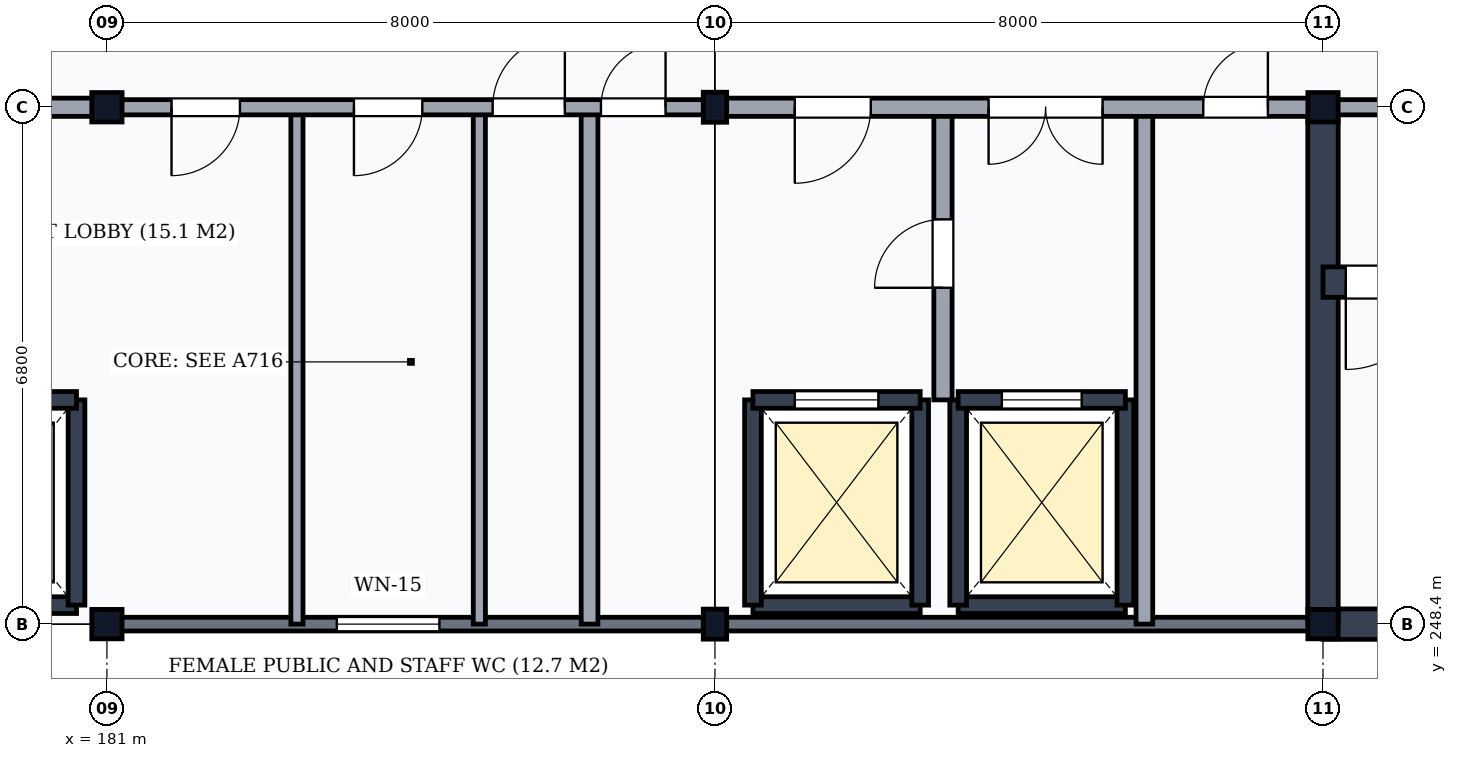
"""IFC4 building model, lengths in metres.
Left out: names, types, materials, properties, quantities, classifications, styles, units other than length and angle.
Written with IfcOpenShell. Run it as: python <this file> out.ifc"""

import sys

from ifc_helpers import new_model, si_unit, direction, frame, frame_2d, origin, origin_2d, place, context, subcontext, project, spatial, rectangle, i_section, extrude, element, fill, save


model = new_model("IFC4")
c1 = context("Model", 3, precision=1e-05, world=origin(), true_north=direction((0.0, 1.0)))
c2 = subcontext(c1, "Body", "Model", "MODEL_VIEW")
j1 = project(units=[si_unit("LENGTHUNIT", "METRE"), si_unit("PLANEANGLEUNIT", "RADIAN")], contexts=[c1])
p1 = place(None, origin())
s1 = spatial("IfcSite", under=j1, at=p1, CompositionType="ELEMENT")
p2 = place(p1, origin())
s2 = spatial("IfcBuilding", under=s1, at=p2, CompositionType="ELEMENT")
p3 = place(p2, frame((0.0, 0.0, 24.3)))
s3 = spatial("IfcBuildingStorey", under=s2, at=p3, CompositionType="ELEMENT", Elevation=24.3)
for number, where, z_axis, x_axis in (
    (1, (181.0, 248.4, 0.0), (0.0, 0.0, 1.0), (1.0, 0.0, 0.0)),
    (2, (181.0, 255.2, 0.0), (0.0, 0.0, 1.0), (1.0, 0.0, 0.0)),
):
    element("IfcColumn", number, at=place(p3, frame(where, z_axis=z_axis, x_axis=x_axis)), inside=s3, PredefinedType="COLUMN", context=c2, shape_type="SweptSolid", body=[
        extrude(i_section(OverallWidth=0.398, OverallDepth=0.387, WebThickness=0.021, FlangeThickness=0.033, FilletRadius=0.015, at=origin_2d()), origin(), (0.0, 0.0, 1.0), 3.9),
    ])
for number, where, z_axis, x_axis in (
    (3, (189.0, 248.4, 0.0), (0.0, 0.0, 1.0), (1.0, 0.0, 0.0)),
    (4, (189.0, 255.2, 0.0), (0.0, 0.0, 1.0), (1.0, 0.0, 0.0)),
):
    element("IfcColumn", number, at=place(p3, frame(where, z_axis=z_axis, x_axis=x_axis)), inside=s3, PredefinedType="COLUMN", context=c2, shape_type="SweptSolid", body=[
        extrude(i_section(OverallWidth=0.308, OverallDepth=0.395, WebThickness=0.021, FlangeThickness=0.04, FilletRadius=0.027, at=origin_2d()), origin(), (0.0, 0.0, 1.0), 3.9),
    ])
for number, where, z_axis, x_axis in (
    (5, (197.0, 248.4, 0.0), (0.0, 0.0, 1.0), (1.0, 0.0, 0.0)),
    (6, (197.0, 255.2, 0.0), (0.0, 0.0, 1.0), (1.0, 0.0, 0.0)),
):
    element("IfcColumn", number, at=place(p3, frame(where, z_axis=z_axis, x_axis=x_axis)), inside=s3, PredefinedType="COLUMN", context=c2, shape_type="SweptSolid", body=[
        extrude(i_section(OverallWidth=0.398, OverallDepth=0.387, WebThickness=0.021, FlangeThickness=0.033, FilletRadius=0.015, at=origin_2d()), origin(), (0.0, 0.0, 1.0), 3.9),
    ])
p4 = place(p3, frame((181.006, 248.4, 0.0), z_axis=(0.0, 0.0, 1.0), x_axis=(1.0, 0.0, 0.0)))
e7 = element("IfcWall", 7, at=p4, inside=s3, PredefinedType="SOLIDWALL", context=c2, shape_type="SweptSolid", body=[
    extrude(rectangle(XDim=7.988, YDim=0.18, at=frame_2d((3.994, 0.0))), origin(), (0.0, 0.0, 1.0), 3.348),
])
p5 = place(p4, frame((3.019, 0.0, 0.95)))
e8 = element("IfcOpeningElement", 8, at=p5, cuts=e7, PredefinedType="OPENING", context=c2, shape_type="SweptSolid", body=[
    extrude(rectangle(XDim=1.35, YDim=1.8, at=frame_2d((0.675, 0.9))), frame((0.0, 0.105, 0.0), z_axis=(0.0, -1.0, 0.0), x_axis=(1.0, 0.0, 0.0)), (0.0, 0.0, 1.0), 0.21),
])
p6 = place(p3, frame((189.006, 248.4, 0.0), z_axis=(0.0, 0.0, 1.0), x_axis=(1.0, 0.0, 0.0)))
e9 = element("IfcWall", 9, at=p6, inside=s3, PredefinedType="SOLIDWALL", context=c2, shape_type="SweptSolid", body=[
    extrude(rectangle(XDim=7.988, YDim=0.18, at=frame_2d((3.994, 0.0))), origin(), (0.0, 0.0, 1.0), 3.348),
])
p7 = place(p3, frame((197.0, 248.4, 0.0), z_axis=(0.0, 0.0, 1.0), x_axis=(1.0, 0.0, 0.0)))
e10 = element("IfcWall", 10, at=p7, inside=s3, PredefinedType="SHEAR", context=c2, shape_type="SweptSolid", body=[
    extrude(rectangle(XDim=8.0, YDim=0.4, at=frame_2d((4.0, 0.0))), origin(), (0.0, 0.0, 1.0), 3.66),
])
p8 = place(p3, frame((197.0, 248.4, 0.0), z_axis=(0.0, 0.0, 1.0), x_axis=(0.0, 1.0, 0.0)))
e11 = element("IfcWall", 11, at=p8, inside=s3, PredefinedType="SHEAR", context=c2, shape_type="SweptSolid", body=[
    extrude(rectangle(XDim=6.8, YDim=0.4, at=frame_2d((3.4, 0.0))), origin(), (0.0, 0.0, 1.0), 3.66),
])
p9 = place(p3, frame((197.0, 252.9, 0.0), z_axis=(0.0, 0.0, 1.0), x_axis=(1.0, 0.0, 0.0)))
e12 = element("IfcWall", 12, at=p9, inside=s3, PredefinedType="SHEAR", context=c2, shape_type="SweptSolid", body=[
    extrude(rectangle(XDim=8.0, YDim=0.4, at=frame_2d((4.0, 0.0))), origin(), (0.0, 0.0, 1.0), 3.66),
])
p10 = place(p9, frame((0.3, 0.0, 0.0)))
e13 = element("IfcOpeningElement", 13, at=p10, cuts=e12, PredefinedType="OPENING", context=c2, shape_type="SweptSolid", body=[
    extrude(rectangle(XDim=1.15, YDim=2.15, at=frame_2d((0.575, 1.075))), frame((0.0, 0.215, 0.0), z_axis=(0.0, -1.0, 0.0), x_axis=(1.0, 0.0, 0.0)), (0.0, 0.0, 1.0), 0.43),
])
p11 = place(p3, frame((197.0, 255.2, 0.0), z_axis=(0.0, 0.0, 1.0), x_axis=(1.0, 0.0, 0.0)))
e14 = element("IfcWall", 14, at=p11, inside=s3, PredefinedType="PARTITIONING", context=c2, shape_type="SweptSolid", body=[
    extrude(rectangle(XDim=8.0, YDim=0.2, at=frame_2d((4.0, 0.0))), origin(), (0.0, 0.0, 1.0), 3.058),
])
p12 = place(p11, frame((3.275, 0.0, 0.0)))
e15 = element("IfcOpeningElement", 15, at=p12, cuts=e14, PredefinedType="OPENING", context=c2, shape_type="SweptSolid", body=[
    extrude(rectangle(XDim=1.45, YDim=2.2, at=frame_2d((0.725, 1.1))), frame((0.0, 0.115, 0.0), z_axis=(0.0, -1.0, 0.0), x_axis=(1.0, 0.0, 0.0)), (0.0, 0.0, 1.0), 0.23),
])
p13 = place(p3, frame((178.4, 248.65, 0.0), z_axis=(0.0, 0.0, 1.0), x_axis=(1.0, 0.0, 0.0)))
e16 = element("IfcWall", 16, at=p13, inside=s3, PredefinedType="SHEAR", context=c2, shape_type="SweptSolid", body=[
    extrude(rectangle(XDim=2.2, YDim=0.22, at=frame_2d((1.1, 0.0))), origin(), (0.0, 0.0, 1.0), 3.66),
])
p14 = place(p3, frame((180.6, 248.65, 0.0), z_axis=(0.0, 0.0, 1.0), x_axis=(0.0, 1.0, 0.0)))
e17 = element("IfcWall", 17, at=p14, inside=s3, PredefinedType="SHEAR", context=c2, shape_type="SweptSolid", body=[
    extrude(rectangle(XDim=2.7, YDim=0.22, at=frame_2d((1.35, 0.0))), origin(), (0.0, 0.0, 1.0), 3.66),
])
p15 = place(p3, frame((178.4, 251.35, 0.0), z_axis=(0.0, 0.0, 1.0), x_axis=(1.0, 0.0, 0.0)))
e18 = element("IfcWall", 18, at=p15, inside=s3, PredefinedType="SHEAR", context=c2, shape_type="SweptSolid", body=[
    extrude(rectangle(XDim=2.2, YDim=0.22, at=frame_2d((1.1, 0.0))), origin(), (0.0, 0.0, 1.0), 3.66),
])
p16 = place(p15, frame((0.575, 0.0, 0.0)))
e19 = element("IfcOpeningElement", 19, at=p16, cuts=e18, PredefinedType="OPENING", context=c2, shape_type="SweptSolid", body=[
    extrude(rectangle(XDim=1.05, YDim=2.15, at=frame_2d((0.525, 1.075))), frame((0.0, 0.125, 0.0), z_axis=(0.0, -1.0, 0.0), x_axis=(1.0, 0.0, 0.0)), (0.0, 0.0, 1.0), 0.25),
])
p17 = place(p3, frame((189.5, 248.65, 0.0), z_axis=(0.0, 0.0, 1.0), x_axis=(1.0, 0.0, 0.0)))
e20 = element("IfcWall", 20, at=p17, inside=s3, PredefinedType="SHEAR", context=c2, shape_type="SweptSolid", body=[
    extrude(rectangle(XDim=2.2, YDim=0.22, at=frame_2d((1.1, 0.0))), origin(), (0.0, 0.0, 1.0), 3.66),
])
for number, where, z_axis, x_axis in (
    (21, (189.5, 248.65, 0.0), (0.0, 0.0, 1.0), (0.0, 1.0, 0.0)),
    (22, (191.7, 248.65, 0.0), (0.0, 0.0, 1.0), (0.0, 1.0, 0.0)),
):
    element("IfcWall", number, at=place(p3, frame(where, z_axis=z_axis, x_axis=x_axis)), inside=s3, PredefinedType="SHEAR", context=c2, shape_type="SweptSolid", body=[
        extrude(rectangle(XDim=2.7, YDim=0.22, at=frame_2d((1.35, 0.0))), origin(), (0.0, 0.0, 1.0), 3.66),
    ])
p18 = place(p3, frame((189.5, 251.35, 0.0), z_axis=(0.0, 0.0, 1.0), x_axis=(1.0, 0.0, 0.0)))
e23 = element("IfcWall", 23, at=p18, inside=s3, PredefinedType="SHEAR", context=c2, shape_type="SweptSolid", body=[
    extrude(rectangle(XDim=2.2, YDim=0.22, at=frame_2d((1.1, 0.0))), origin(), (0.0, 0.0, 1.0), 3.66),
])
p19 = place(p18, frame((0.55, 0.0, 0.0)))
e24 = element("IfcOpeningElement", 24, at=p19, cuts=e23, PredefinedType="OPENING", context=c2, shape_type="SweptSolid", body=[
    extrude(rectangle(XDim=1.1, YDim=2.15, at=frame_2d((0.55, 1.075))), frame((0.0, 0.125, 0.0), z_axis=(0.0, -1.0, 0.0), x_axis=(1.0, 0.0, 0.0)), (0.0, 0.0, 1.0), 0.25),
])
p20 = place(p3, frame((192.2, 248.65, 0.0), z_axis=(0.0, 0.0, 1.0), x_axis=(1.0, 0.0, 0.0)))
e25 = element("IfcWall", 25, at=p20, inside=s3, PredefinedType="SHEAR", context=c2, shape_type="SweptSolid", body=[
    extrude(rectangle(XDim=2.2, YDim=0.22, at=frame_2d((1.1, 0.0))), origin(), (0.0, 0.0, 1.0), 3.66),
])
for number, where, z_axis, x_axis in (
    (26, (192.2, 248.65, 0.0), (0.0, 0.0, 1.0), (0.0, 1.0, 0.0)),
    (27, (194.4, 248.65, 0.0), (0.0, 0.0, 1.0), (0.0, 1.0, 0.0)),
):
    element("IfcWall", number, at=place(p3, frame(where, z_axis=z_axis, x_axis=x_axis)), inside=s3, PredefinedType="SHEAR", context=c2, shape_type="SweptSolid", body=[
        extrude(rectangle(XDim=2.7, YDim=0.22, at=frame_2d((1.35, 0.0))), origin(), (0.0, 0.0, 1.0), 3.66),
    ])
p21 = place(p3, frame((192.2, 251.35, 0.0), z_axis=(0.0, 0.0, 1.0), x_axis=(1.0, 0.0, 0.0)))
e28 = element("IfcWall", 28, at=p21, inside=s3, PredefinedType="SHEAR", context=c2, shape_type="SweptSolid", body=[
    extrude(rectangle(XDim=2.2, YDim=0.22, at=frame_2d((1.1, 0.0))), origin(), (0.0, 0.0, 1.0), 3.66),
])
p22 = place(p21, frame((0.575, 0.0, 0.0)))
e29 = element("IfcOpeningElement", 29, at=p22, cuts=e28, PredefinedType="OPENING", context=c2, shape_type="SweptSolid", body=[
    extrude(rectangle(XDim=1.05, YDim=2.15, at=frame_2d((0.525, 1.075))), frame((0.0, 0.125, 0.0), z_axis=(0.0, -1.0, 0.0), x_axis=(1.0, 0.0, 0.0)), (0.0, 0.0, 1.0), 0.25),
])
p23 = place(p3, frame((192.0, 251.35, 0.0), z_axis=(0.0, 0.0, 1.0), x_axis=(0.0, 1.0, 0.0)))
e30 = element("IfcWall", 30, at=p23, inside=s3, PredefinedType="PARTITIONING", context=c2, shape_type="SweptSolid", body=[
    extrude(rectangle(XDim=3.85, YDim=0.24, at=frame_2d((1.925, 0.0))), origin(), (0.0, 0.0, 1.0), 3.66),
])
p24 = place(p23, frame((1.475, 0.0, 0.0)))
e31 = element("IfcOpeningElement", 31, at=p24, cuts=e30, PredefinedType="OPENING", context=c2, shape_type="SweptSolid", body=[
    extrude(rectangle(XDim=0.9, YDim=2.1, at=frame_2d((0.45, 1.05))), frame((0.0, 0.135, 0.0), z_axis=(0.0, -1.0, 0.0), x_axis=(1.0, 0.0, 0.0)), (0.0, 0.0, 1.0), 0.27),
])
p25 = place(p3, frame((194.65, 248.4, 0.0), z_axis=(0.0, 0.0, 1.0), x_axis=(0.0, 1.0, 0.0)))
e32 = element("IfcWall", 32, at=p25, inside=s3, PredefinedType="PARTITIONING", context=c2, shape_type="SweptSolid", body=[
    extrude(rectangle(XDim=6.8, YDim=0.22, at=frame_2d((3.4, 0.0))), origin(), (0.0, 0.0, 1.0), 3.66),
])
for number, where, z_axis, x_axis in (
    (33, (183.5, 248.4, 0.0), (0.0, 0.0, 1.0), (0.0, 1.0, 0.0)),
    (34, (185.9, 248.4, 0.0), (0.0, 0.0, 1.0), (0.0, 1.0, 0.0)),
):
    element("IfcWall", number, at=place(p3, frame(where, z_axis=z_axis, x_axis=x_axis)), inside=s3, PredefinedType="PARTITIONING", context=c2, shape_type="SweptSolid", body=[
        extrude(rectangle(XDim=6.8, YDim=0.16, at=frame_2d((3.4, 0.0))), origin(), (0.0, 0.0, 1.0), 3.66),
    ])
p26 = place(p3, frame((187.35, 248.4, 0.0), z_axis=(0.0, 0.0, 1.0), x_axis=(0.0, 1.0, 0.0)))
e35 = element("IfcWall", 35, at=p26, inside=s3, PredefinedType="PARTITIONING", context=c2, shape_type="SweptSolid", body=[
    extrude(rectangle(XDim=6.8, YDim=0.22, at=frame_2d((3.4, 0.0))), origin(), (0.0, 0.0, 1.0), 3.66),
])
p27 = place(p3, frame((173.0, 255.2, 0.0), z_axis=(0.0, 0.0, 1.0), x_axis=(1.0, 0.0, 0.0)))
e36 = element("IfcWall", 36, at=p27, inside=s3, PredefinedType="PARTITIONING", context=c2, shape_type="SweptSolid", body=[
    extrude(rectangle(XDim=8.0, YDim=0.24, at=frame_2d((4.0, 0.0))), origin(), (0.0, 0.0, 1.0), 3.058),
])
p28 = place(p27, frame((1.05, 0.0, 0.0)))
e37 = element("IfcOpeningElement", 37, at=p28, cuts=e36, PredefinedType="OPENING", context=c2, shape_type="SweptSolid", body=[
    extrude(rectangle(XDim=1.0, YDim=2.1, at=frame_2d((0.5, 1.05))), frame((0.0, 0.135, 0.0), z_axis=(0.0, -1.0, 0.0), x_axis=(1.0, 0.0, 0.0)), (0.0, 0.0, 1.0), 0.27),
])
p29 = place(p27, frame((4.6, 0.0, 0.0)))
e38 = element("IfcOpeningElement", 38, at=p29, cuts=e36, PredefinedType="OPENING", context=c2, shape_type="SweptSolid", body=[
    extrude(rectangle(XDim=1.6, YDim=2.25, at=frame_2d((0.8, 1.125))), frame((0.0, 0.135, 0.0), z_axis=(0.0, -1.0, 0.0), x_axis=(1.0, 0.0, 0.0)), (0.0, 0.0, 1.0), 0.27),
])
p30 = place(p3, frame((181.0, 255.2, 0.0), z_axis=(0.0, 0.0, 1.0), x_axis=(1.0, 0.0, 0.0)))
e39 = element("IfcWall", 39, at=p30, inside=s3, PredefinedType="PARTITIONING", context=c2, shape_type="SweptSolid", body=[
    extrude(rectangle(XDim=8.0, YDim=0.2, at=frame_2d((4.0, 0.0))), origin(), (0.0, 0.0, 1.0), 3.058),
])
p31 = place(p30, frame((0.85, 0.0, 0.0)))
e40 = element("IfcOpeningElement", 40, at=p31, cuts=e39, PredefinedType="OPENING", context=c2, shape_type="SweptSolid", body=[
    extrude(rectangle(XDim=0.9, YDim=2.1, at=frame_2d((0.45, 1.05))), frame((0.0, 0.115, 0.0), z_axis=(0.0, -1.0, 0.0), x_axis=(1.0, 0.0, 0.0)), (0.0, 0.0, 1.0), 0.23),
])
p32 = place(p30, frame((3.25, 0.0, 0.0)))
e41 = element("IfcOpeningElement", 41, at=p32, cuts=e39, PredefinedType="OPENING", context=c2, shape_type="SweptSolid", body=[
    extrude(rectangle(XDim=0.9, YDim=2.1, at=frame_2d((0.45, 1.05))), frame((0.0, 0.115, 0.0), z_axis=(0.0, -1.0, 0.0), x_axis=(1.0, 0.0, 0.0)), (0.0, 0.0, 1.0), 0.23),
])
p33 = place(p30, frame((5.075, 0.0, 0.0)))
e42 = element("IfcOpeningElement", 42, at=p33, cuts=e39, PredefinedType="OPENING", context=c2, shape_type="SweptSolid", body=[
    extrude(rectangle(XDim=0.95, YDim=2.1, at=frame_2d((0.475, 1.05))), frame((0.0, 0.115, 0.0), z_axis=(0.0, -1.0, 0.0), x_axis=(1.0, 0.0, 0.0)), (0.0, 0.0, 1.0), 0.23),
])
p34 = place(p30, frame((6.5, 0.0, 0.0)))
e43 = element("IfcOpeningElement", 43, at=p34, cuts=e39, PredefinedType="OPENING", context=c2, shape_type="SweptSolid", body=[
    extrude(rectangle(XDim=0.85, YDim=2.1, at=frame_2d((0.425, 1.05))), frame((0.0, 0.115, 0.0), z_axis=(0.0, -1.0, 0.0), x_axis=(1.0, 0.0, 0.0)), (0.0, 0.0, 1.0), 0.23),
])
p35 = place(p3, frame((189.0, 255.2, 0.0), z_axis=(0.0, 0.0, 1.0), x_axis=(1.0, 0.0, 0.0)))
e44 = element("IfcWall", 44, at=p35, inside=s3, PredefinedType="PARTITIONING", context=c2, shape_type="SweptSolid", body=[
    extrude(rectangle(XDim=8.0, YDim=0.24, at=frame_2d((4.0, 0.0))), origin(), (0.0, 0.0, 1.0), 3.058),
])
p36 = place(p35, frame((1.05, 0.0, 0.0)))
e45 = element("IfcOpeningElement", 45, at=p36, cuts=e44, PredefinedType="OPENING", context=c2, shape_type="SweptSolid", body=[
    extrude(rectangle(XDim=1.0, YDim=2.1, at=frame_2d((0.5, 1.05))), frame((0.0, 0.135, 0.0), z_axis=(0.0, -1.0, 0.0), x_axis=(1.0, 0.0, 0.0)), (0.0, 0.0, 1.0), 0.27),
])
p37 = place(p35, frame((3.6, 0.0, 0.0)))
e46 = element("IfcOpeningElement", 46, at=p37, cuts=e44, PredefinedType="OPENING", context=c2, shape_type="SweptSolid", body=[
    extrude(rectangle(XDim=1.5, YDim=2.25, at=frame_2d((0.75, 1.125))), frame((0.0, 0.135, 0.0), z_axis=(0.0, -1.0, 0.0), x_axis=(1.0, 0.0, 0.0)), (0.0, 0.0, 1.0), 0.27),
])
p38 = place(p35, frame((6.425, 0.0, 0.0)))
e47 = element("IfcOpeningElement", 47, at=p38, cuts=e44, PredefinedType="OPENING", context=c2, shape_type="SweptSolid", body=[
    extrude(rectangle(XDim=0.85, YDim=2.1, at=frame_2d((0.425, 1.05))), frame((0.0, 0.135, 0.0), z_axis=(0.0, -1.0, 0.0), x_axis=(1.0, 0.0, 0.0)), (0.0, 0.0, 1.0), 0.27),
])
p39 = place(p5, origin())
e48 = element("IfcWindow", 48, at=p39, inside=s3, PartitioningType="SINGLE_PANEL", PredefinedType="WINDOW", context=c2, shape_type="SweptSolid", body=[
    extrude(rectangle(XDim=1.35, YDim=1.8, at=frame_2d((0.675, 0.9))), frame((0.0, 0.03, 0.0), z_axis=(0.0, -1.0, 0.0), x_axis=(1.0, 0.0, 0.0)), (0.0, 0.0, 1.0), 0.06),
])
fill(e8, e48)
p40 = place(p10, frame((1.15, 0.0, 0.0), z_axis=(0.0, 0.0, 1.0), x_axis=(-1.0, 0.0, 0.0)))
e49 = element("IfcDoor", 49, at=p40, inside=s3, OperationType="SINGLE_SWING_RIGHT", PredefinedType="DOOR", context=c2, shape_type="SweptSolid", body=[
    extrude(rectangle(XDim=1.15, YDim=2.15, at=frame_2d((0.575, 1.075))), frame((0.0, 0.025, 0.0), z_axis=(0.0, -1.0, 0.0), x_axis=(1.0, 0.0, 0.0)), (0.0, 0.0, 1.0), 0.05),
])
fill(e13, e49)
p41 = place(p19, origin())
e50 = element("IfcDoor", 50, at=p41, inside=s3, OperationType="DOUBLE_DOOR_SLIDING", PredefinedType="USERDEFINED", context=c2, shape_type="SweptSolid", body=[
    extrude(rectangle(XDim=1.1, YDim=2.15, at=frame_2d((0.55, 1.075))), frame((0.0, 0.025, 0.0), z_axis=(0.0, -1.0, 0.0), x_axis=(1.0, 0.0, 0.0)), (0.0, 0.0, 1.0), 0.05),
])
fill(e24, e50)
p42 = place(p22, origin())
e51 = element("IfcDoor", 51, at=p42, inside=s3, OperationType="DOUBLE_DOOR_SLIDING", PredefinedType="USERDEFINED", context=c2, shape_type="SweptSolid", body=[
    extrude(rectangle(XDim=1.05, YDim=2.15, at=frame_2d((0.525, 1.075))), frame((0.0, 0.025, 0.0), z_axis=(0.0, -1.0, 0.0), x_axis=(1.0, 0.0, 0.0)), (0.0, 0.0, 1.0), 0.05),
])
fill(e29, e51)
p43 = place(p24, origin())
e52 = element("IfcDoor", 52, at=p43, inside=s3, OperationType="SINGLE_SWING_LEFT", PredefinedType="DOOR", context=c2, shape_type="SweptSolid", body=[
    extrude(rectangle(XDim=0.9, YDim=2.1, at=frame_2d((0.45, 1.05))), frame((0.0, 0.025, 0.0), z_axis=(0.0, -1.0, 0.0), x_axis=(1.0, 0.0, 0.0)), (0.0, 0.0, 1.0), 0.05),
])
fill(e31, e52)
p44 = place(p31, frame((0.9, 0.0, 0.0), z_axis=(0.0, 0.0, 1.0), x_axis=(-1.0, 0.0, 0.0)))
e53 = element("IfcDoor", 53, at=p44, inside=s3, OperationType="SINGLE_SWING_RIGHT", PredefinedType="DOOR", context=c2, shape_type="SweptSolid", body=[
    extrude(rectangle(XDim=0.9, YDim=2.1, at=frame_2d((0.45, 1.05))), frame((0.0, 0.025, 0.0), z_axis=(0.0, -1.0, 0.0), x_axis=(1.0, 0.0, 0.0)), (0.0, 0.0, 1.0), 0.05),
])
fill(e40, e53)
p45 = place(p32, frame((0.9, 0.0, 0.0), z_axis=(0.0, 0.0, 1.0), x_axis=(-1.0, 0.0, 0.0)))
e54 = element("IfcDoor", 54, at=p45, inside=s3, OperationType="SINGLE_SWING_RIGHT", PredefinedType="DOOR", context=c2, shape_type="SweptSolid", body=[
    extrude(rectangle(XDim=0.9, YDim=2.1, at=frame_2d((0.45, 1.05))), frame((0.0, 0.025, 0.0), z_axis=(0.0, -1.0, 0.0), x_axis=(1.0, 0.0, 0.0)), (0.0, 0.0, 1.0), 0.05),
])
fill(e41, e54)
p46 = place(p33, frame((0.95, 0.0, 0.0), z_axis=(0.0, 0.0, 1.0), x_axis=(-1.0, 0.0, 0.0)))
e55 = element("IfcDoor", 55, at=p46, inside=s3, OperationType="SINGLE_SWING_LEFT", PredefinedType="DOOR", context=c2, shape_type="SweptSolid", body=[
    extrude(rectangle(XDim=0.95, YDim=2.1, at=frame_2d((0.475, 1.05))), frame((0.0, 0.025, 0.0), z_axis=(0.0, -1.0, 0.0), x_axis=(1.0, 0.0, 0.0)), (0.0, 0.0, 1.0), 0.05),
])
fill(e42, e55)
p47 = place(p34, frame((0.85, 0.0, 0.0), z_axis=(0.0, 0.0, 1.0), x_axis=(-1.0, 0.0, 0.0)))
e56 = element("IfcDoor", 56, at=p47, inside=s3, OperationType="SINGLE_SWING_LEFT", PredefinedType="DOOR", context=c2, shape_type="SweptSolid", body=[
    extrude(rectangle(XDim=0.85, YDim=2.1, at=frame_2d((0.425, 1.05))), frame((0.0, 0.025, 0.0), z_axis=(0.0, -1.0, 0.0), x_axis=(1.0, 0.0, 0.0)), (0.0, 0.0, 1.0), 0.05),
])
fill(e43, e56)
p48 = place(p36, frame((1.0, 0.0, 0.0), z_axis=(0.0, 0.0, 1.0), x_axis=(-1.0, 0.0, 0.0)))
e57 = element("IfcDoor", 57, at=p48, inside=s3, OperationType="SINGLE_SWING_RIGHT", PredefinedType="DOOR", context=c2, shape_type="SweptSolid", body=[
    extrude(rectangle(XDim=1.0, YDim=2.1, at=frame_2d((0.5, 1.05))), frame((0.0, 0.025, 0.0), z_axis=(0.0, -1.0, 0.0), x_axis=(1.0, 0.0, 0.0)), (0.0, 0.0, 1.0), 0.05),
])
fill(e45, e57)
p49 = place(p37, frame((1.5, 0.0, 0.0), z_axis=(0.0, 0.0, 1.0), x_axis=(-1.0, 0.0, 0.0)))
e58 = element("IfcDoor", 58, at=p49, inside=s3, OperationType="DOUBLE_DOOR_SINGLE_SWING", PredefinedType="DOOR", context=c2, shape_type="SweptSolid", body=[
    extrude(rectangle(XDim=1.5, YDim=2.25, at=frame_2d((0.75, 1.125))), frame((0.0, 0.025, 0.0), z_axis=(0.0, -1.0, 0.0), x_axis=(1.0, 0.0, 0.0)), (0.0, 0.0, 1.0), 0.05),
])
fill(e46, e58)
p50 = place(p38, frame((0.85, 0.0, 0.0), z_axis=(0.0, 0.0, 1.0), x_axis=(-1.0, 0.0, 0.0)))
e59 = element("IfcDoor", 59, at=p50, inside=s3, OperationType="SINGLE_SWING_LEFT", PredefinedType="DOOR", context=c2, shape_type="SweptSolid", body=[
    extrude(rectangle(XDim=0.85, YDim=2.1, at=frame_2d((0.425, 1.05))), frame((0.0, 0.025, 0.0), z_axis=(0.0, -1.0, 0.0), x_axis=(1.0, 0.0, 0.0)), (0.0, 0.0, 1.0), 0.05),
])
fill(e47, e59)
save(model, sys.argv[1])
